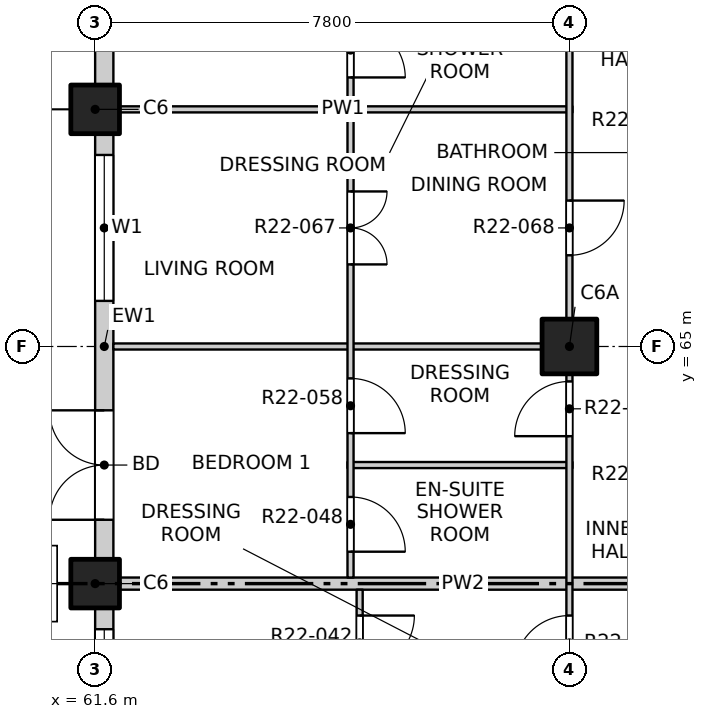
"""IFC4 building model, lengths in metres.
Left out: names, types, materials, properties, quantities, classifications, styles, units other than length and angle.
Written with IfcOpenShell. Run it as: python <this file> out.ifc"""

import sys

from ifc_helpers import new_model, si_unit, direction, frame, frame_2d, origin, origin_2d, place, context, subcontext, project, spatial, rectangle, extrude, element, fill, save


model = new_model("IFC4")
c1 = context("Model", 3, precision=1e-05, world=origin(), true_north=direction((0.0, 1.0)))
c2 = subcontext(c1, "Body", "Model", "MODEL_VIEW")
j1 = project(units=[si_unit("LENGTHUNIT", "METRE"), si_unit("PLANEANGLEUNIT", "RADIAN")], contexts=[c1])
p1 = place(None, origin())
s1 = spatial("IfcSite", under=j1, at=p1, CompositionType="ELEMENT")
p2 = place(p1, origin())
s2 = spatial("IfcBuilding", under=s1, at=p2, CompositionType="ELEMENT")
p3 = place(p2, frame((0.0, 0.0, 224.5)))
s3 = spatial("IfcBuildingStorey", under=s2, at=p3, CompositionType="ELEMENT", Elevation=224.5)
for number, where, z_axis, x_axis in (
    (1, (61.6, 61.1, -0.25), (0.0, 0.0, 1.0), (1.0, 0.0, 0.0)),
    (2, (61.6, 68.9, -0.25), (0.0, 0.0, 1.0), (1.0, 0.0, 0.0)),
):
    element("IfcColumn", number, at=place(p3, frame(where, z_axis=z_axis, x_axis=x_axis)), inside=s3, PredefinedType="COLUMN", context=c2, shape_type="SweptSolid", body=[
        extrude(rectangle(XDim=0.8, YDim=0.8, at=origin_2d()), origin(), (0.0, 0.0, 1.0), 3.4),
    ])
p4 = place(p3, frame((69.4, 65.0, -0.25), z_axis=(0.0, 0.0, 1.0), x_axis=(1.0, 0.0, 0.0)))
e3 = element("IfcColumn", 3, at=p4, inside=s3, PredefinedType="COLUMN", context=c2, shape_type="SweptSolid", body=[
    extrude(rectangle(XDim=0.9, YDim=0.9, at=origin_2d()), origin(), (0.0, 0.0, 1.0), 3.4),
])
p5 = place(p3, frame((61.75, 53.7, 0.0), z_axis=(0.0, 0.0, 1.0), x_axis=(0.0, 1.0, 0.0)))
e4 = element("IfcWall", 4, at=p5, inside=s3, PredefinedType="SOLIDWALL", context=c2, shape_type="SweptSolid", body=[
    extrude(rectangle(XDim=7.0, YDim=0.3, at=frame_2d((3.5, 0.0))), origin(), (0.0, 0.0, 1.0), 2.7),
])
p6 = place(p5, frame((0.65, 0.0, 0.0)))
e5 = element("IfcOpeningElement", 5, at=p6, cuts=e4, PredefinedType="OPENING", context=c2, shape_type="SweptSolid", body=[
    extrude(rectangle(XDim=1.8, YDim=2.4, at=frame_2d((0.9, 1.2))), frame((0.0, 0.16, 0.0), z_axis=(0.0, -1.0, 0.0), x_axis=(1.0, 0.0, 0.0)), (0.0, 0.0, 1.0), 0.32),
])
p7 = place(p5, frame((4.25, 0.0, 0.9)))
e6 = element("IfcOpeningElement", 6, at=p7, cuts=e4, PredefinedType="OPENING", context=c2, shape_type="SweptSolid", body=[
    extrude(rectangle(XDim=2.4, YDim=1.8, at=frame_2d((1.2, 0.9))), frame((0.0, 0.16, 0.0), z_axis=(0.0, -1.0, 0.0), x_axis=(1.0, 0.0, 0.0)), (0.0, 0.0, 1.0), 0.32),
])
p8 = place(p3, frame((61.75, 61.5, 0.0), z_axis=(0.0, 0.0, 1.0), x_axis=(0.0, 1.0, 0.0)))
e7 = element("IfcWall", 7, at=p8, inside=s3, PredefinedType="SOLIDWALL", context=c2, shape_type="SweptSolid", body=[
    extrude(rectangle(XDim=7.0, YDim=0.3, at=frame_2d((3.5, 0.0))), origin(), (0.0, 0.0, 1.0), 2.7),
])
p9 = place(p8, frame((0.65, 0.0, 0.0)))
e8 = element("IfcOpeningElement", 8, at=p9, cuts=e7, PredefinedType="OPENING", context=c2, shape_type="SweptSolid", body=[
    extrude(rectangle(XDim=1.8, YDim=2.4, at=frame_2d((0.9, 1.2))), frame((0.0, 0.16, 0.0), z_axis=(0.0, -1.0, 0.0), x_axis=(1.0, 0.0, 0.0)), (0.0, 0.0, 1.0), 0.32),
])
p10 = place(p8, frame((4.25, 0.0, 0.9)))
e9 = element("IfcOpeningElement", 9, at=p10, cuts=e7, PredefinedType="OPENING", context=c2, shape_type="SweptSolid", body=[
    extrude(rectangle(XDim=2.4, YDim=1.8, at=frame_2d((1.2, 0.9))), frame((0.0, 0.16, 0.0), z_axis=(0.0, -1.0, 0.0), x_axis=(1.0, 0.0, 0.0)), (0.0, 0.0, 1.0), 0.32),
])
p11 = place(p3, frame((61.75, 69.3, 0.0), z_axis=(0.0, 0.0, 1.0), x_axis=(0.0, 1.0, 0.0)))
e10 = element("IfcWall", 10, at=p11, inside=s3, PredefinedType="SOLIDWALL", context=c2, shape_type="SweptSolid", body=[
    extrude(rectangle(XDim=7.0, YDim=0.3, at=frame_2d((3.5, 0.0))), origin(), (0.0, 0.0, 1.0), 2.7),
])
p12 = place(p11, frame((0.65, 0.0, 0.0)))
e11 = element("IfcOpeningElement", 11, at=p12, cuts=e10, PredefinedType="OPENING", context=c2, shape_type="SweptSolid", body=[
    extrude(rectangle(XDim=1.8, YDim=2.4, at=frame_2d((0.9, 1.2))), frame((0.0, 0.16, 0.0), z_axis=(0.0, -1.0, 0.0), x_axis=(1.0, 0.0, 0.0)), (0.0, 0.0, 1.0), 0.32),
])
p13 = place(p11, frame((4.25, 0.0, 0.9)))
e12 = element("IfcOpeningElement", 12, at=p13, cuts=e10, PredefinedType="OPENING", context=c2, shape_type="SweptSolid", body=[
    extrude(rectangle(XDim=2.4, YDim=1.8, at=frame_2d((1.2, 0.9))), frame((0.0, 0.16, 0.0), z_axis=(0.0, -1.0, 0.0), x_axis=(1.0, 0.0, 0.0)), (0.0, 0.0, 1.0), 0.32),
])
p14 = place(p3, frame((61.9, 61.1, 0.0), z_axis=(0.0, 0.0, 1.0), x_axis=(1.0, 0.0, 0.0)))
e13 = element("IfcWall", 13, at=p14, inside=s3, PredefinedType="PARTITIONING", context=c2, shape_type="SweptSolid", body=[
    extrude(rectangle(XDim=11.5, YDim=0.2, at=frame_2d((5.75, 0.0))), origin(), (0.0, 0.0, 1.0), 2.55),
])
p15 = place(p3, frame((65.75, 63.05, 0.0), z_axis=(0.0, 0.0, 1.0), x_axis=(1.0, 0.0, 0.0)))
e14 = element("IfcWall", 14, at=p15, inside=s3, PredefinedType="PARTITIONING", context=c2, shape_type="SweptSolid", body=[
    extrude(rectangle(XDim=3.7, YDim=0.1, at=frame_2d((1.85, 0.0))), origin(), (0.0, 0.0, 1.0), 3.15),
])
p16 = place(p3, frame((61.9, 65.0, 0.0), z_axis=(0.0, 0.0, 1.0), x_axis=(1.0, 0.0, 0.0)))
e15 = element("IfcWall", 15, at=p16, inside=s3, PredefinedType="PARTITIONING", context=c2, shape_type="SweptSolid", body=[
    extrude(rectangle(XDim=7.55, YDim=0.1, at=frame_2d((3.775, 0.0))), origin(), (0.0, 0.0, 1.0), 3.15),
])
p17 = place(p3, frame((61.9, 68.9, 0.0), z_axis=(0.0, 0.0, 1.0), x_axis=(1.0, 0.0, 0.0)))
e16 = element("IfcWall", 16, at=p17, inside=s3, PredefinedType="PARTITIONING", context=c2, shape_type="SweptSolid", body=[
    extrude(rectangle(XDim=7.55, YDim=0.1, at=frame_2d((3.775, 0.0))), origin(), (0.0, 0.0, 1.0), 2.55),
])
p18 = place(p3, frame((65.8, 61.2, 0.0), z_axis=(0.0, 0.0, 1.0), x_axis=(0.0, 1.0, 0.0)))
e17 = element("IfcWall", 17, at=p18, inside=s3, PredefinedType="PARTITIONING", context=c2, shape_type="SweptSolid", body=[
    extrude(rectangle(XDim=11.5, YDim=0.1, at=frame_2d((5.75, 0.0))), origin(), (0.0, 0.0, 1.0), 3.15),
])
p19 = place(p18, frame((0.425, 0.0, 0.0)))
e18 = element("IfcOpeningElement", 18, at=p19, cuts=e17, PredefinedType="OPENING", context=c2, shape_type="SweptSolid", body=[
    extrude(rectangle(XDim=0.9, YDim=2.1, at=frame_2d((0.45, 1.05))), frame((0.0, 0.06, 0.0), z_axis=(0.0, -1.0, 0.0), x_axis=(1.0, 0.0, 0.0)), (0.0, 0.0, 1.0), 0.12),
])
p20 = place(p18, frame((2.375, 0.0, 0.0)))
e19 = element("IfcOpeningElement", 19, at=p20, cuts=e17, PredefinedType="OPENING", context=c2, shape_type="SweptSolid", body=[
    extrude(rectangle(XDim=0.9, YDim=2.1, at=frame_2d((0.45, 1.05))), frame((0.0, 0.06, 0.0), z_axis=(0.0, -1.0, 0.0), x_axis=(1.0, 0.0, 0.0)), (0.0, 0.0, 1.0), 0.12),
])
p21 = place(p18, frame((5.15, 0.0, 0.0)))
e20 = element("IfcOpeningElement", 20, at=p21, cuts=e17, PredefinedType="OPENING", context=c2, shape_type="SweptSolid", body=[
    extrude(rectangle(XDim=1.2, YDim=2.1, at=frame_2d((0.6, 1.05))), frame((0.0, 0.06, 0.0), z_axis=(0.0, -1.0, 0.0), x_axis=(1.0, 0.0, 0.0)), (0.0, 0.0, 1.0), 0.12),
])
p22 = place(p18, frame((8.225, 0.0, 0.0)))
e21 = element("IfcOpeningElement", 21, at=p22, cuts=e17, PredefinedType="OPENING", context=c2, shape_type="SweptSolid", body=[
    extrude(rectangle(XDim=0.9, YDim=2.1, at=frame_2d((0.45, 1.05))), frame((0.0, 0.06, 0.0), z_axis=(0.0, -1.0, 0.0), x_axis=(1.0, 0.0, 0.0)), (0.0, 0.0, 1.0), 0.12),
])
p23 = place(p18, frame((10.175, 0.0, 0.0)))
e22 = element("IfcOpeningElement", 22, at=p23, cuts=e17, PredefinedType="OPENING", context=c2, shape_type="SweptSolid", body=[
    extrude(rectangle(XDim=0.9, YDim=2.1, at=frame_2d((0.45, 1.05))), frame((0.0, 0.06, 0.0), z_axis=(0.0, -1.0, 0.0), x_axis=(1.0, 0.0, 0.0)), (0.0, 0.0, 1.0), 0.12),
])
p24 = place(p3, frame((65.95, 41.9, 0.0), z_axis=(0.0, 0.0, 1.0), x_axis=(0.0, 1.0, 0.0)))
e23 = element("IfcWall", 23, at=p24, inside=s3, PredefinedType="PARTITIONING", context=c2, shape_type="SweptSolid", body=[
    extrude(rectangle(XDim=19.1, YDim=0.1, at=frame_2d((9.55, 0.0))), origin(), (0.0, 0.0, 1.0), 3.15),
])
p25 = place(p24, frame((1.05, 0.0, 0.0)))
e24 = element("IfcOpeningElement", 24, at=p25, cuts=e23, PredefinedType="OPENING", context=c2, shape_type="SweptSolid", body=[
    extrude(rectangle(XDim=1.2, YDim=2.1, at=frame_2d((0.6, 1.05))), frame((0.0, 0.06, 0.0), z_axis=(0.0, -1.0, 0.0), x_axis=(1.0, 0.0, 0.0)), (0.0, 0.0, 1.0), 0.12),
])
p26 = place(p24, frame((4.95, 0.0, 0.0)))
e25 = element("IfcOpeningElement", 25, at=p26, cuts=e23, PredefinedType="OPENING", context=c2, shape_type="SweptSolid", body=[
    extrude(rectangle(XDim=1.2, YDim=2.1, at=frame_2d((0.6, 1.05))), frame((0.0, 0.06, 0.0), z_axis=(0.0, -1.0, 0.0), x_axis=(1.0, 0.0, 0.0)), (0.0, 0.0, 1.0), 0.12),
])
p27 = place(p24, frame((8.85, 0.0, 0.0)))
e26 = element("IfcOpeningElement", 26, at=p27, cuts=e23, PredefinedType="OPENING", context=c2, shape_type="SweptSolid", body=[
    extrude(rectangle(XDim=1.2, YDim=2.1, at=frame_2d((0.6, 1.05))), frame((0.0, 0.06, 0.0), z_axis=(0.0, -1.0, 0.0), x_axis=(1.0, 0.0, 0.0)), (0.0, 0.0, 1.0), 0.12),
])
p28 = place(p24, frame((11.925, 0.0, 0.0)))
e27 = element("IfcOpeningElement", 27, at=p28, cuts=e23, PredefinedType="OPENING", context=c2, shape_type="SweptSolid", body=[
    extrude(rectangle(XDim=0.9, YDim=2.1, at=frame_2d((0.45, 1.05))), frame((0.0, 0.06, 0.0), z_axis=(0.0, -1.0, 0.0), x_axis=(1.0, 0.0, 0.0)), (0.0, 0.0, 1.0), 0.12),
])
p29 = place(p24, frame((13.875, 0.0, 0.0)))
e28 = element("IfcOpeningElement", 28, at=p29, cuts=e23, PredefinedType="OPENING", context=c2, shape_type="SweptSolid", body=[
    extrude(rectangle(XDim=0.9, YDim=2.1, at=frame_2d((0.45, 1.05))), frame((0.0, 0.06, 0.0), z_axis=(0.0, -1.0, 0.0), x_axis=(1.0, 0.0, 0.0)), (0.0, 0.0, 1.0), 0.12),
])
p30 = place(p24, frame((15.825, 0.0, 0.0)))
e29 = element("IfcOpeningElement", 29, at=p30, cuts=e23, PredefinedType="OPENING", context=c2, shape_type="SweptSolid", body=[
    extrude(rectangle(XDim=0.9, YDim=2.1, at=frame_2d((0.45, 1.05))), frame((0.0, 0.06, 0.0), z_axis=(0.0, -1.0, 0.0), x_axis=(1.0, 0.0, 0.0)), (0.0, 0.0, 1.0), 0.12),
])
p31 = place(p24, frame((17.775, 0.0, 0.0)))
e30 = element("IfcOpeningElement", 30, at=p31, cuts=e23, PredefinedType="OPENING", context=c2, shape_type="SweptSolid", body=[
    extrude(rectangle(XDim=0.9, YDim=2.1, at=frame_2d((0.45, 1.05))), frame((0.0, 0.06, 0.0), z_axis=(0.0, -1.0, 0.0), x_axis=(1.0, 0.0, 0.0)), (0.0, 0.0, 1.0), 0.12),
])
p32 = place(p3, frame((69.4, 41.9, 0.0), z_axis=(0.0, 0.0, 1.0), x_axis=(0.0, 1.0, 0.0)))
e31 = element("IfcWall", 31, at=p32, inside=s3, PredefinedType="PARTITIONING", context=c2, shape_type="SweptSolid", body=[
    extrude(rectangle(XDim=46.2, YDim=0.1, at=frame_2d((23.1, 0.0))), origin(), (0.0, 0.0, 1.0), 3.15),
])
p33 = place(p32, frame((1.2, 0.0, 0.0)))
e32 = element("IfcOpeningElement", 32, at=p33, cuts=e31, PredefinedType="OPENING", context=c2, shape_type="SweptSolid", body=[
    extrude(rectangle(XDim=0.9, YDim=2.1, at=frame_2d((0.45, 1.05))), frame((0.0, 0.06, 0.0), z_axis=(0.0, -1.0, 0.0), x_axis=(1.0, 0.0, 0.0)), (0.0, 0.0, 1.0), 0.12),
])
p34 = place(p32, frame((5.1, 0.0, 0.0)))
e33 = element("IfcOpeningElement", 33, at=p34, cuts=e31, PredefinedType="OPENING", context=c2, shape_type="SweptSolid", body=[
    extrude(rectangle(XDim=0.9, YDim=2.1, at=frame_2d((0.45, 1.05))), frame((0.0, 0.06, 0.0), z_axis=(0.0, -1.0, 0.0), x_axis=(1.0, 0.0, 0.0)), (0.0, 0.0, 1.0), 0.12),
])
p35 = place(p32, frame((9.0, 0.0, 0.0)))
e34 = element("IfcOpeningElement", 34, at=p35, cuts=e31, PredefinedType="OPENING", context=c2, shape_type="SweptSolid", body=[
    extrude(rectangle(XDim=0.9, YDim=2.1, at=frame_2d((0.45, 1.05))), frame((0.0, 0.06, 0.0), z_axis=(0.0, -1.0, 0.0), x_axis=(1.0, 0.0, 0.0)), (0.0, 0.0, 1.0), 0.12),
])
p36 = place(p32, frame((13.85, 0.0, 0.0)))
e35 = element("IfcOpeningElement", 35, at=p36, cuts=e31, PredefinedType="OPENING", context=c2, shape_type="SweptSolid", body=[
    extrude(rectangle(XDim=0.9, YDim=2.1, at=frame_2d((0.45, 1.05))), frame((0.0, 0.06, 0.0), z_axis=(0.0, -1.0, 0.0), x_axis=(1.0, 0.0, 0.0)), (0.0, 0.0, 1.0), 0.12),
])
p37 = place(p32, frame((17.775, 0.0, 0.0)))
e36 = element("IfcOpeningElement", 36, at=p37, cuts=e31, PredefinedType="OPENING", context=c2, shape_type="SweptSolid", body=[
    extrude(rectangle(XDim=0.9, YDim=2.1, at=frame_2d((0.45, 1.05))), frame((0.0, 0.06, 0.0), z_axis=(0.0, -1.0, 0.0), x_axis=(1.0, 0.0, 0.0)), (0.0, 0.0, 1.0), 0.12),
])
p38 = place(p32, frame((21.625, 0.0, 0.0)))
e37 = element("IfcOpeningElement", 37, at=p38, cuts=e31, PredefinedType="OPENING", context=c2, shape_type="SweptSolid", body=[
    extrude(rectangle(XDim=0.9, YDim=2.1, at=frame_2d((0.45, 1.05))), frame((0.0, 0.06, 0.0), z_axis=(0.0, -1.0, 0.0), x_axis=(1.0, 0.0, 0.0)), (0.0, 0.0, 1.0), 0.12),
])
p39 = place(p32, frame((24.6, 0.0, 0.0)))
e38 = element("IfcOpeningElement", 38, at=p39, cuts=e31, PredefinedType="OPENING", context=c2, shape_type="SweptSolid", body=[
    extrude(rectangle(XDim=0.9, YDim=2.1, at=frame_2d((0.45, 1.05))), frame((0.0, 0.06, 0.0), z_axis=(0.0, -1.0, 0.0), x_axis=(1.0, 0.0, 0.0)), (0.0, 0.0, 1.0), 0.12),
])
p40 = place(p32, frame((29.425, 0.0, 0.0)))
e39 = element("IfcOpeningElement", 39, at=p40, cuts=e31, PredefinedType="OPENING", context=c2, shape_type="SweptSolid", body=[
    extrude(rectangle(XDim=0.9, YDim=2.1, at=frame_2d((0.45, 1.05))), frame((0.0, 0.06, 0.0), z_axis=(0.0, -1.0, 0.0), x_axis=(1.0, 0.0, 0.0)), (0.0, 0.0, 1.0), 0.12),
])
p41 = place(p32, frame((33.375, 0.0, 0.0)))
e40 = element("IfcOpeningElement", 40, at=p41, cuts=e31, PredefinedType="OPENING", context=c2, shape_type="SweptSolid", body=[
    extrude(rectangle(XDim=0.9, YDim=2.1, at=frame_2d((0.45, 1.05))), frame((0.0, 0.06, 0.0), z_axis=(0.0, -1.0, 0.0), x_axis=(1.0, 0.0, 0.0)), (0.0, 0.0, 1.0), 0.12),
])
p42 = place(p32, frame((36.3, 0.0, 0.0)))
e41 = element("IfcOpeningElement", 41, at=p42, cuts=e31, PredefinedType="OPENING", context=c2, shape_type="SweptSolid", body=[
    extrude(rectangle(XDim=0.9, YDim=2.1, at=frame_2d((0.45, 1.05))), frame((0.0, 0.06, 0.0), z_axis=(0.0, -1.0, 0.0), x_axis=(1.0, 0.0, 0.0)), (0.0, 0.0, 1.0), 0.12),
])
p43 = place(p32, frame((41.175, 0.0, 0.0)))
e42 = element("IfcOpeningElement", 42, at=p43, cuts=e31, PredefinedType="OPENING", context=c2, shape_type="SweptSolid", body=[
    extrude(rectangle(XDim=0.9, YDim=2.1, at=frame_2d((0.45, 1.05))), frame((0.0, 0.06, 0.0), z_axis=(0.0, -1.0, 0.0), x_axis=(1.0, 0.0, 0.0)), (0.0, 0.0, 1.0), 0.12),
])
p44 = place(p32, frame((44.1, 0.0, 0.0)))
e43 = element("IfcOpeningElement", 43, at=p44, cuts=e31, PredefinedType="OPENING", context=c2, shape_type="SweptSolid", body=[
    extrude(rectangle(XDim=0.9, YDim=2.1, at=frame_2d((0.45, 1.05))), frame((0.0, 0.06, 0.0), z_axis=(0.0, -1.0, 0.0), x_axis=(1.0, 0.0, 0.0)), (0.0, 0.0, 1.0), 0.12),
])
p45 = place(p7, origin())
e44 = element("IfcWindow", 44, at=p45, inside=s3, PartitioningType="DOUBLE_PANEL_VERTICAL", PredefinedType="WINDOW", context=c2, shape_type="SweptSolid", body=[
    extrude(rectangle(XDim=2.4, YDim=1.8, at=frame_2d((1.2, 0.9))), frame((0.0, 0.03, 0.0), z_axis=(0.0, -1.0, 0.0), x_axis=(1.0, 0.0, 0.0)), (0.0, 0.0, 1.0), 0.06),
])
fill(e6, e44)
p46 = place(p9, origin())
e45 = element("IfcDoor", 45, at=p46, inside=s3, OperationType="DOUBLE_DOOR_SINGLE_SWING", PredefinedType="DOOR", context=c2, shape_type="SweptSolid", body=[
    extrude(rectangle(XDim=1.8, YDim=2.4, at=frame_2d((0.9, 1.2))), frame((0.0, 0.025, 0.0), z_axis=(0.0, -1.0, 0.0), x_axis=(1.0, 0.0, 0.0)), (0.0, 0.0, 1.0), 0.05),
])
fill(e8, e45)
p47 = place(p10, origin())
e46 = element("IfcWindow", 46, at=p47, inside=s3, PartitioningType="DOUBLE_PANEL_VERTICAL", PredefinedType="WINDOW", context=c2, shape_type="SweptSolid", body=[
    extrude(rectangle(XDim=2.4, YDim=1.8, at=frame_2d((1.2, 0.9))), frame((0.0, 0.03, 0.0), z_axis=(0.0, -1.0, 0.0), x_axis=(1.0, 0.0, 0.0)), (0.0, 0.0, 1.0), 0.06),
])
fill(e9, e46)
p48 = place(p31, origin())
e47 = element("IfcDoor", 47, at=p48, inside=s3, OperationType="SINGLE_SWING_LEFT", PredefinedType="DOOR", context=c2, shape_type="SweptSolid", body=[
    extrude(rectangle(XDim=0.9, YDim=2.1, at=frame_2d((0.45, 1.05))), frame((0.0, 0.025, 0.0), z_axis=(0.0, -1.0, 0.0), x_axis=(1.0, 0.0, 0.0)), (0.0, 0.0, 1.0), 0.05),
])
fill(e30, e47)
p49 = place(p37, origin())
e48 = element("IfcDoor", 48, at=p49, inside=s3, OperationType="SINGLE_SWING_LEFT", PredefinedType="DOOR", context=c2, shape_type="SweptSolid", body=[
    extrude(rectangle(XDim=0.9, YDim=2.1, at=frame_2d((0.45, 1.05))), frame((0.0, 0.025, 0.0), z_axis=(0.0, -1.0, 0.0), x_axis=(1.0, 0.0, 0.0)), (0.0, 0.0, 1.0), 0.05),
])
fill(e36, e48)
p50 = place(p19, origin())
e49 = element("IfcDoor", 49, at=p50, inside=s3, OperationType="SINGLE_SWING_RIGHT", PredefinedType="DOOR", context=c2, shape_type="SweptSolid", body=[
    extrude(rectangle(XDim=0.9, YDim=2.1, at=frame_2d((0.45, 1.05))), frame((0.0, 0.025, 0.0), z_axis=(0.0, -1.0, 0.0), x_axis=(1.0, 0.0, 0.0)), (0.0, 0.0, 1.0), 0.05),
])
fill(e18, e49)
p51 = place(p38, origin())
e50 = element("IfcDoor", 50, at=p51, inside=s3, OperationType="SINGLE_SWING_LEFT", PredefinedType="DOOR", context=c2, shape_type="SweptSolid", body=[
    extrude(rectangle(XDim=0.9, YDim=2.1, at=frame_2d((0.45, 1.05))), frame((0.0, 0.025, 0.0), z_axis=(0.0, -1.0, 0.0), x_axis=(1.0, 0.0, 0.0)), (0.0, 0.0, 1.0), 0.05),
])
fill(e37, e50)
p52 = place(p20, origin())
e51 = element("IfcDoor", 51, at=p52, inside=s3, OperationType="SINGLE_SWING_RIGHT", PredefinedType="DOOR", context=c2, shape_type="SweptSolid", body=[
    extrude(rectangle(XDim=0.9, YDim=2.1, at=frame_2d((0.45, 1.05))), frame((0.0, 0.025, 0.0), z_axis=(0.0, -1.0, 0.0), x_axis=(1.0, 0.0, 0.0)), (0.0, 0.0, 1.0), 0.05),
])
fill(e19, e51)
p53 = place(p21, origin())
e52 = element("IfcDoor", 52, at=p53, inside=s3, OperationType="DOUBLE_DOOR_SINGLE_SWING", PredefinedType="DOOR", context=c2, shape_type="SweptSolid", body=[
    extrude(rectangle(XDim=1.2, YDim=2.1, at=frame_2d((0.6, 1.05))), frame((0.0, 0.025, 0.0), z_axis=(0.0, -1.0, 0.0), x_axis=(1.0, 0.0, 0.0)), (0.0, 0.0, 1.0), 0.05),
])
fill(e20, e52)
p54 = place(p39, origin())
e53 = element("IfcDoor", 53, at=p54, inside=s3, OperationType="SINGLE_SWING_LEFT", PredefinedType="DOOR", context=c2, shape_type="SweptSolid", body=[
    extrude(rectangle(XDim=0.9, YDim=2.1, at=frame_2d((0.45, 1.05))), frame((0.0, 0.025, 0.0), z_axis=(0.0, -1.0, 0.0), x_axis=(1.0, 0.0, 0.0)), (0.0, 0.0, 1.0), 0.05),
])
fill(e38, e53)
p55 = place(p22, origin())
e54 = element("IfcDoor", 54, at=p55, inside=s3, OperationType="SINGLE_SWING_RIGHT", PredefinedType="DOOR", context=c2, shape_type="SweptSolid", body=[
    extrude(rectangle(XDim=0.9, YDim=2.1, at=frame_2d((0.45, 1.05))), frame((0.0, 0.025, 0.0), z_axis=(0.0, -1.0, 0.0), x_axis=(1.0, 0.0, 0.0)), (0.0, 0.0, 1.0), 0.05),
])
fill(e21, e54)
save(model, sys.argv[1])
